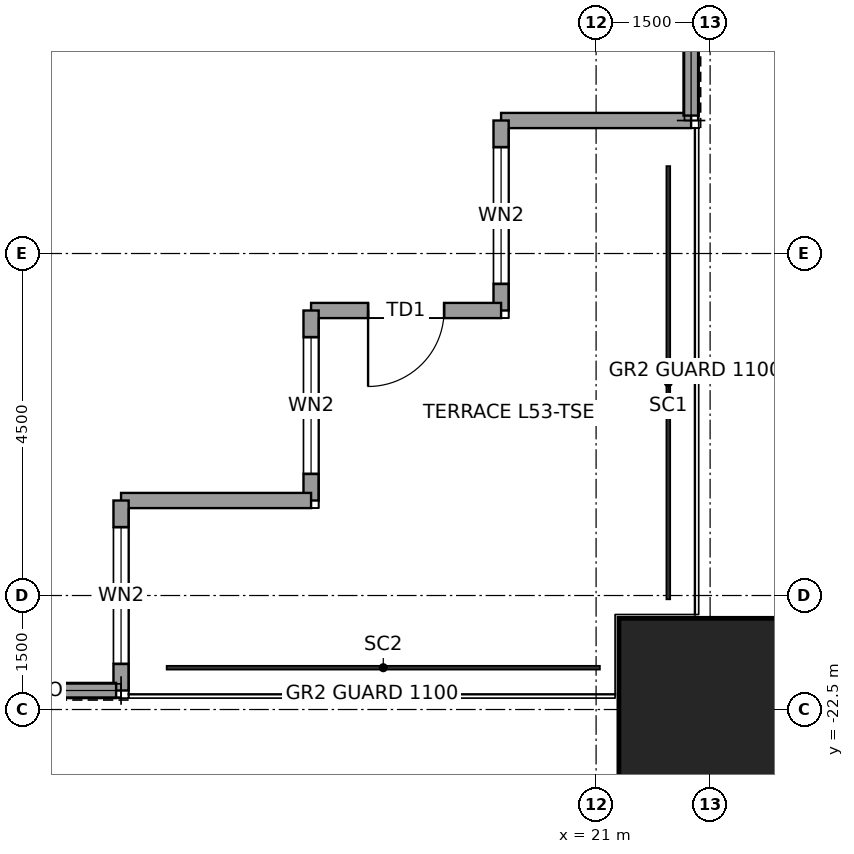
"""IFC4 building model, lengths in metres.
Left out: names, types, materials, properties, quantities, classifications, styles, units other than length and angle.
Written with IfcOpenShell. Run it as: python <this file> out.ifc"""

import sys

from ifc_helpers import new_model, si_unit, direction, frame, frame_2d, origin, origin_2d, place, context, subcontext, project, spatial, rectangle, hollow_rectangle, extrude, element, fill, save


model = new_model("IFC4")
c1 = context("Model", 3, precision=1e-05, world=origin(), true_north=direction((0.0, 1.0)))
c2 = subcontext(c1, "Body", "Model", "MODEL_VIEW")
j1 = project(units=[si_unit("LENGTHUNIT", "METRE"), si_unit("PLANEANGLEUNIT", "RADIAN")], contexts=[c1])
p1 = place(None, origin())
s1 = spatial("IfcSite", under=j1, at=p1, CompositionType="ELEMENT")
p2 = place(p1, origin())
s2 = spatial("IfcBuilding", under=s1, at=p2, CompositionType="ELEMENT")
p3 = place(p2, frame((0.0, 0.0, 245.9)))
s3 = spatial("IfcBuildingStorey", under=s2, at=p3, CompositionType="ELEMENT", Elevation=245.9)
p4 = place(p3, frame((22.5, -22.5, 0.0), z_axis=(0.0, 0.0, 1.0), x_axis=(1.0, 0.0, 0.0)))
e1 = element("IfcColumn", 1, at=p4, inside=s3, PredefinedType="COLUMN", context=c2, shape_type="SweptSolid", body=[
    extrude(hollow_rectangle(XDim=2.4, YDim=2.4, WallThickness=0.12, at=origin_2d()), origin(), (0.0, 0.0, 1.0), 4.0),
])
p5 = place(p3, frame((22.25, -14.75, 0.0), z_axis=(0.0, 0.0, 1.0), x_axis=(-1.0, 0.0, 0.0)))
e2 = element("IfcWall", 2, at=p5, inside=s3, PredefinedType="SOLIDWALL", context=c2, shape_type="SweptSolid", body=[
    extrude(rectangle(XDim=2.5, YDim=0.2, at=frame_2d((1.25, 0.0))), origin(), (0.0, 0.0, 1.0), 3.85),
])
p6 = place(p3, frame((19.75, -14.75, 0.0), z_axis=(0.0, 0.0, 1.0), x_axis=(0.0, -1.0, 0.0)))
e3 = element("IfcWall", 3, at=p6, inside=s3, PredefinedType="SOLIDWALL", context=c2, shape_type="SweptSolid", body=[
    extrude(rectangle(XDim=2.5, YDim=0.2, at=frame_2d((1.25, 0.0))), origin(), (0.0, 0.0, 1.0), 3.85),
])
p7 = place(p6, frame((0.35, 0.0, 0.3)))
e4 = element("IfcOpeningElement", 4, at=p7, cuts=e3, PredefinedType="OPENING", context=c2, shape_type="SweptSolid", body=[
    extrude(rectangle(XDim=1.8, YDim=2.4, at=frame_2d((0.9, 1.2))), frame((0.0, 0.11, 0.0), z_axis=(0.0, -1.0, 0.0), x_axis=(1.0, 0.0, 0.0)), (0.0, 0.0, 1.0), 0.22),
])
p8 = place(p3, frame((19.75, -17.25, 0.0), z_axis=(0.0, 0.0, 1.0), x_axis=(-1.0, 0.0, 0.0)))
e5 = element("IfcWall", 5, at=p8, inside=s3, PredefinedType="SOLIDWALL", context=c2, shape_type="SweptSolid", body=[
    extrude(rectangle(XDim=2.5, YDim=0.2, at=frame_2d((1.25, 0.0))), origin(), (0.0, 0.0, 1.0), 3.85),
])
p9 = place(p8, frame((0.75, 0.0, 0.0)))
e6 = element("IfcOpeningElement", 6, at=p9, cuts=e5, PredefinedType="OPENING", context=c2, shape_type="SweptSolid", body=[
    extrude(rectangle(XDim=1.0, YDim=2.4, at=frame_2d((0.5, 1.2))), frame((0.0, 0.11, 0.0), z_axis=(0.0, -1.0, 0.0), x_axis=(1.0, 0.0, 0.0)), (0.0, 0.0, 1.0), 0.22),
])
p10 = place(p3, frame((17.25, -17.25, 0.0), z_axis=(0.0, 0.0, 1.0), x_axis=(0.0, -1.0, 0.0)))
e7 = element("IfcWall", 7, at=p10, inside=s3, PredefinedType="SOLIDWALL", context=c2, shape_type="SweptSolid", body=[
    extrude(rectangle(XDim=2.5, YDim=0.2, at=frame_2d((1.25, 0.0))), origin(), (0.0, 0.0, 1.0), 3.85),
])
p11 = place(p10, frame((0.35, 0.0, 0.3)))
e8 = element("IfcOpeningElement", 8, at=p11, cuts=e7, PredefinedType="OPENING", context=c2, shape_type="SweptSolid", body=[
    extrude(rectangle(XDim=1.8, YDim=2.4, at=frame_2d((0.9, 1.2))), frame((0.0, 0.11, 0.0), z_axis=(0.0, -1.0, 0.0), x_axis=(1.0, 0.0, 0.0)), (0.0, 0.0, 1.0), 0.22),
])
p12 = place(p3, frame((17.25, -19.75, 0.0), z_axis=(0.0, 0.0, 1.0), x_axis=(-1.0, 0.0, 0.0)))
e9 = element("IfcWall", 9, at=p12, inside=s3, PredefinedType="SOLIDWALL", context=c2, shape_type="SweptSolid", body=[
    extrude(rectangle(XDim=2.5, YDim=0.2, at=frame_2d((1.25, 0.0))), origin(), (0.0, 0.0, 1.0), 3.85),
])
p13 = place(p3, frame((14.75, -19.75, 0.0), z_axis=(0.0, 0.0, 1.0), x_axis=(0.0, -1.0, 0.0)))
e10 = element("IfcWall", 10, at=p13, inside=s3, PredefinedType="SOLIDWALL", context=c2, shape_type="SweptSolid", body=[
    extrude(rectangle(XDim=2.5, YDim=0.2, at=frame_2d((1.25, 0.0))), origin(), (0.0, 0.0, 1.0), 3.85),
])
p14 = place(p13, frame((0.35, 0.0, 0.3)))
e11 = element("IfcOpeningElement", 11, at=p14, cuts=e10, PredefinedType="OPENING", context=c2, shape_type="SweptSolid", body=[
    extrude(rectangle(XDim=1.8, YDim=2.4, at=frame_2d((0.9, 1.2))), frame((0.0, 0.11, 0.0), z_axis=(0.0, -1.0, 0.0), x_axis=(1.0, 0.0, 0.0)), (0.0, 0.0, 1.0), 0.22),
])
for number, where, z_axis, x_axis in (
    (12, (22.25, -12.398, 0.0), (0.0, 0.0, 1.0), (0.0, -1.0, 0.0)),
    (13, (14.685, -22.25, 0.0), (0.0, 0.0, 1.0), (-1.0, 0.0, 0.0)),
):
    element("IfcWall", number, at=place(p3, frame(where, z_axis=z_axis, x_axis=x_axis)), inside=s3, PredefinedType="SOLIDWALL", context=c2, shape_type="SweptSolid", body=[
        extrude(rectangle(XDim=2.287, YDim=0.2, at=frame_2d((1.144, 0.0))), origin(), (0.0, 0.0, 1.0), 3.85),
    ])
p15 = place(p7, origin())
e14 = element("IfcWindow", 14, at=p15, inside=s3, PartitioningType="SINGLE_PANEL", PredefinedType="WINDOW", context=c2, shape_type="SweptSolid", body=[
    extrude(rectangle(XDim=1.8, YDim=2.4, at=frame_2d((0.9, 1.2))), frame((0.0, 0.03, 0.0), z_axis=(0.0, -1.0, 0.0), x_axis=(1.0, 0.0, 0.0)), (0.0, 0.0, 1.0), 0.06),
])
fill(e4, e14)
p16 = place(p9, origin())
e15 = element("IfcDoor", 15, at=p16, inside=s3, OperationType="SINGLE_SWING_RIGHT", PredefinedType="DOOR", context=c2, shape_type="SweptSolid", body=[
    extrude(rectangle(XDim=1.0, YDim=2.4, at=frame_2d((0.5, 1.2))), frame((0.0, 0.025, 0.0), z_axis=(0.0, -1.0, 0.0), x_axis=(1.0, 0.0, 0.0)), (0.0, 0.0, 1.0), 0.05),
])
fill(e6, e15)
p17 = place(p11, origin())
e16 = element("IfcWindow", 16, at=p17, inside=s3, PartitioningType="SINGLE_PANEL", PredefinedType="WINDOW", context=c2, shape_type="SweptSolid", body=[
    extrude(rectangle(XDim=1.8, YDim=2.4, at=frame_2d((0.9, 1.2))), frame((0.0, 0.03, 0.0), z_axis=(0.0, -1.0, 0.0), x_axis=(1.0, 0.0, 0.0)), (0.0, 0.0, 1.0), 0.06),
])
fill(e8, e16)
p18 = place(p14, origin())
e17 = element("IfcWindow", 17, at=p18, inside=s3, PartitioningType="SINGLE_PANEL", PredefinedType="WINDOW", context=c2, shape_type="SweptSolid", body=[
    extrude(rectangle(XDim=1.8, YDim=2.4, at=frame_2d((0.9, 1.2))), frame((0.0, 0.03, 0.0), z_axis=(0.0, -1.0, 0.0), x_axis=(1.0, 0.0, 0.0)), (0.0, 0.0, 1.0), 0.06),
])
fill(e11, e17)
save(model, sys.argv[1])
